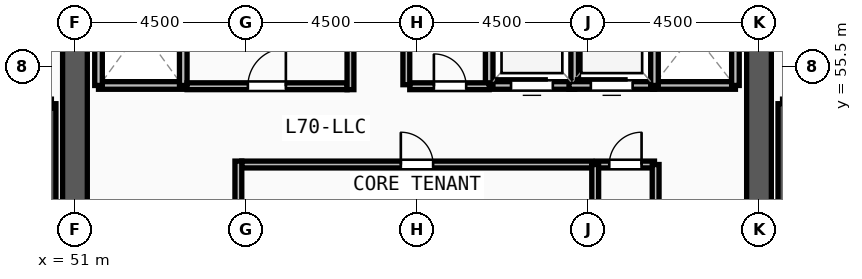
"""IFC4 building model, lengths in metres.
Left out: names, types, materials, properties, quantities, classifications, styles, units other than length and angle.
Written with IfcOpenShell. Run it as: python <this file> out.ifc"""

import sys

from ifc_helpers import new_model, si_unit, direction, frame, frame_2d, origin, place, context, subcontext, project, spatial, rectangle, extrude, source, transform, mapped, element, fill, save


model = new_model("IFC4")
c1 = context("Model", 3, precision=1e-05, world=origin(), true_north=direction((0.0, 1.0)))
c2 = subcontext(c1, "Body", "Model", "MODEL_VIEW")
j1 = project(units=[si_unit("LENGTHUNIT", "METRE"), si_unit("PLANEANGLEUNIT", "RADIAN")], contexts=[c1])
p1 = place(None, origin())
s1 = spatial("IfcSite", under=j1, at=p1, CompositionType="ELEMENT")
p2 = place(p1, origin())
s2 = spatial("IfcBuilding", under=s1, at=p2, CompositionType="ELEMENT")
p3 = place(p2, frame((0.0, 0.0, 270.0)))
s3 = spatial("IfcBuildingStorey", under=s2, at=p3, CompositionType="ELEMENT", Elevation=270.0)
p4 = place(p3, frame((69.0, 60.825, 0.0), z_axis=(0.0, 0.0, 1.0), x_axis=(0.0, -1.0, 0.0)))
e1 = element("IfcWall", 1, at=p4, inside=s3, PredefinedType="SHEAR", context=c2, shape_type="SweptSolid", body=[
    extrude(rectangle(XDim=13.65, YDim=0.65, at=frame_2d((6.825, 0.0))), origin(), (0.0, 0.0, 1.0), 3.57),
])
m1 = source(origin(), c2, "Body", "SweptSolid", [
    extrude(rectangle(XDim=1.2, YDim=2.2, at=frame_2d((0.6, 1.1))), frame((0.0, 0.335, 0.0), z_axis=(0.0, -1.0, 0.0), x_axis=(1.0, 0.0, 0.0)), (0.0, 0.0, 1.0), 0.67),
])
p5 = place(p4, frame((1.275, 0.0, 0.0)))
e2 = element("IfcOpeningElement", 2, at=p5, cuts=e1, PredefinedType="OPENING", context=c2, shape_type="MappedRepresentation", body=[
    mapped(m1, transform((0.0, 0.0, 0.0), x_axis=(1.0, 0.0, 0.0), y_axis=(0.0, 1.0, 0.0), z_axis=(0.0, 0.0, 1.0), scale=1.0)),
])
p6 = place(p3, frame((51.0, 47.175, 0.0), z_axis=(0.0, 0.0, 1.0), x_axis=(0.0, 1.0, 0.0)))
e3 = element("IfcWall", 3, at=p6, inside=s3, PredefinedType="SHEAR", context=c2, shape_type="SweptSolid", body=[
    extrude(rectangle(XDim=13.65, YDim=0.65, at=frame_2d((6.825, 0.0))), origin(), (0.0, 0.0, 1.0), 3.57),
])
for number, where, z_axis, x_axis in (
    (4, (50.38, 46.7, 0.0), (0.0, 0.0, 1.0), (0.0, 1.0, 0.0)),
    (5, (69.62, 54.52, 0.0), (0.0, 0.0, 1.0), (0.0, -1.0, 0.0)),
):
    element("IfcWall", number, at=place(p3, frame(where, z_axis=z_axis, x_axis=x_axis)), inside=s3, PredefinedType="SOLIDWALL", context=c2, shape_type="SweptSolid", body=[
        extrude(rectangle(XDim=7.82, YDim=0.24, at=frame_2d((3.91, 0.0))), origin(), (0.0, 0.0, 1.0), 3.57),
    ])
p7 = place(p3, frame((51.62, 55.0, 0.0), z_axis=(0.0, 0.0, 1.0), x_axis=(1.0, 0.0, 0.0)))
e6 = element("IfcWall", 6, at=p7, inside=s3, PredefinedType="SOLIDWALL", context=c2, shape_type="SweptSolid", body=[
    extrude(rectangle(XDim=2.23, YDim=0.2, at=frame_2d((1.115, 0.0))), origin(), (0.0, 0.0, 1.0), 3.57),
])
for number, where, z_axis, x_axis in (
    (7, (53.85, 55.0, 0.0), (0.0, 0.0, 1.0), (0.0, 1.0, 0.0)),
    (8, (51.62, 58.0, 0.0), (0.0, 0.0, 1.0), (0.0, -1.0, 0.0)),
):
    element("IfcWall", number, at=place(p3, frame(where, z_axis=z_axis, x_axis=x_axis)), inside=s3, PredefinedType="SOLIDWALL", context=c2, shape_type="SweptSolid", body=[
        extrude(rectangle(XDim=3.0, YDim=0.2, at=frame_2d((1.5, 0.0))), origin(), (0.0, 0.0, 1.0), 3.57),
    ])
p8 = place(p3, frame((66.2, 55.0, 0.0), z_axis=(0.0, 0.0, 1.0), x_axis=(1.0, 0.0, 0.0)))
e9 = element("IfcWall", 9, at=p8, inside=s3, PredefinedType="SOLIDWALL", context=c2, shape_type="SweptSolid", body=[
    extrude(rectangle(XDim=2.18, YDim=0.2, at=frame_2d((1.09, 0.0))), origin(), (0.0, 0.0, 1.0), 3.57),
])
p9 = place(p3, frame((68.38, 55.0, 0.0), z_axis=(0.0, 0.0, 1.0), x_axis=(0.0, 1.0, 0.0)))
e10 = element("IfcWall", 10, at=p9, inside=s3, PredefinedType="SOLIDWALL", context=c2, shape_type="SweptSolid", body=[
    extrude(rectangle(XDim=2.75, YDim=0.2, at=frame_2d((1.375, 0.0))), origin(), (0.0, 0.0, 1.0), 3.57),
])
p10 = place(p3, frame((61.9, 55.0, 0.0), z_axis=(0.0, 0.0, 1.0), x_axis=(1.0, 0.0, 0.0)))
e11 = element("IfcWall", 11, at=p10, inside=s3, PredefinedType="SOLIDWALL", context=c2, shape_type="SweptSolid", body=[
    extrude(rectangle(XDim=2.25, YDim=0.2, at=frame_2d((1.125, 0.0))), origin(), (0.0, 0.0, 1.0), 3.57),
])
m2 = source(origin(), c2, "Body", "SweptSolid", [
    extrude(rectangle(XDim=1.1, YDim=2.2, at=frame_2d((0.55, 1.1))), frame((0.0, 0.11, 0.0), z_axis=(0.0, -1.0, 0.0), x_axis=(1.0, 0.0, 0.0)), (0.0, 0.0, 1.0), 0.22),
])
p11 = place(p10, frame((0.575, 0.0, 0.0)))
e12 = element("IfcOpeningElement", 12, at=p11, cuts=e11, PredefinedType="OPENING", context=c2, shape_type="MappedRepresentation", body=[
    mapped(m2, transform((0.0, 0.0, 0.0), x_axis=(1.0, 0.0, 0.0), y_axis=(0.0, 1.0, 0.0), z_axis=(0.0, 0.0, 1.0), scale=1.0)),
])
for number, where, z_axis, x_axis in (
    (13, (64.15, 55.0, 0.0), (0.0, 0.0, 1.0), (0.0, 1.0, 0.0)),
    (14, (61.9, 57.6, 0.0), (0.0, 0.0, 1.0), (0.0, -1.0, 0.0)),
):
    element("IfcWall", number, at=place(p3, frame(where, z_axis=z_axis, x_axis=x_axis)), inside=s3, PredefinedType="SOLIDWALL", context=c2, shape_type="SweptSolid", body=[
        extrude(rectangle(XDim=2.6, YDim=0.2, at=frame_2d((1.3, 0.0))), origin(), (0.0, 0.0, 1.0), 3.57),
    ])
p12 = place(p3, frame((64.0, 55.0, 0.0), z_axis=(0.0, 0.0, 1.0), x_axis=(1.0, 0.0, 0.0)))
e15 = element("IfcWall", 15, at=p12, inside=s3, PredefinedType="SOLIDWALL", context=c2, shape_type="SweptSolid", body=[
    extrude(rectangle(XDim=2.25, YDim=0.2, at=frame_2d((1.125, 0.0))), origin(), (0.0, 0.0, 1.0), 3.57),
])
p13 = place(p12, frame((0.575, 0.0, 0.0)))
e16 = element("IfcOpeningElement", 16, at=p13, cuts=e15, PredefinedType="OPENING", context=c2, shape_type="MappedRepresentation", body=[
    mapped(m2, transform((0.0, 0.0, 0.0), x_axis=(1.0, 0.0, 0.0), y_axis=(0.0, 1.0, 0.0), z_axis=(0.0, 0.0, 1.0), scale=1.0)),
])
p14 = place(p3, frame((66.25, 55.0, 0.0), z_axis=(0.0, 0.0, 1.0), x_axis=(0.0, 1.0, 0.0)))
e17 = element("IfcWall", 17, at=p14, inside=s3, PredefinedType="SOLIDWALL", context=c2, shape_type="SweptSolid", body=[
    extrude(rectangle(XDim=2.6, YDim=0.2, at=frame_2d((1.3, 0.0))), origin(), (0.0, 0.0, 1.0), 3.57),
])
p15 = place(p3, frame((55.39, 52.92, 0.0), z_axis=(0.0, 0.0, 1.0), x_axis=(1.0, 0.0, 0.0)))
e18 = element("IfcWall", 18, at=p15, inside=s3, PredefinedType="PARTITIONING", context=c2, shape_type="SweptSolid", body=[
    extrude(rectangle(XDim=9.21, YDim=0.18, at=frame_2d((4.605, 0.0))), origin(), (0.0, 0.0, 1.0), 3.57),
])
m3 = source(origin(), c2, "Body", "SweptSolid", [
    extrude(rectangle(XDim=0.85, YDim=2.1, at=frame_2d((0.425, 1.05))), frame((0.0, 0.1, 0.0), z_axis=(0.0, -1.0, 0.0), x_axis=(1.0, 0.0, 0.0)), (0.0, 0.0, 1.0), 0.2),
])
p16 = place(p15, frame((4.185, 0.0, 0.0)))
e19 = element("IfcOpeningElement", 19, at=p16, cuts=e18, PredefinedType="OPENING", context=c2, shape_type="MappedRepresentation", body=[
    mapped(m3, transform((0.0, 0.0, 0.0), x_axis=(1.0, 0.0, 0.0), y_axis=(0.0, 1.0, 0.0), z_axis=(0.0, 0.0, 1.0), scale=1.0)),
])
p17 = place(p3, frame((53.95, 54.98, 0.0), z_axis=(0.0, 0.0, 1.0), x_axis=(1.0, 0.0, 0.0)))
e20 = element("IfcWall", 20, at=p17, inside=s3, PredefinedType="PARTITIONING", context=c2, shape_type="SweptSolid", body=[
    extrude(rectangle(XDim=4.21, YDim=0.18, at=frame_2d((2.105, 0.0))), origin(), (0.0, 0.0, 1.0), 3.57),
])
m4 = source(origin(), c2, "Body", "SweptSolid", [
    extrude(rectangle(XDim=1.0, YDim=2.2, at=frame_2d((0.5, 1.1))), frame((0.0, 0.1, 0.0), z_axis=(0.0, -1.0, 0.0), x_axis=(1.0, 0.0, 0.0)), (0.0, 0.0, 1.0), 0.2),
])
p18 = place(p17, frame((1.6, 0.0, 0.0)))
e21 = element("IfcOpeningElement", 21, at=p18, cuts=e20, PredefinedType="OPENING", context=c2, shape_type="MappedRepresentation", body=[
    mapped(m4, transform((0.0, 0.0, 0.0), x_axis=(1.0, 0.0, 0.0), y_axis=(0.0, 1.0, 0.0), z_axis=(0.0, 0.0, 1.0), scale=1.0)),
])
p19 = place(p3, frame((59.81, 54.98, 0.0), z_axis=(0.0, 0.0, 1.0), x_axis=(1.0, 0.0, 0.0)))
e22 = element("IfcWall", 22, at=p19, inside=s3, PredefinedType="PARTITIONING", context=c2, shape_type="SweptSolid", body=[
    extrude(rectangle(XDim=2.09, YDim=0.18, at=frame_2d((1.045, 0.0))), origin(), (0.0, 0.0, 1.0), 3.57),
])
p20 = place(p19, frame((0.635, 0.0, 0.0)))
e23 = element("IfcOpeningElement", 23, at=p20, cuts=e22, PredefinedType="OPENING", context=c2, shape_type="MappedRepresentation", body=[
    mapped(m3, transform((0.0, 0.0, 0.0), x_axis=(1.0, 0.0, 0.0), y_axis=(0.0, 1.0, 0.0), z_axis=(0.0, 0.0, 1.0), scale=1.0)),
])
p21 = place(p3, frame((64.72, 52.92, 0.0), z_axis=(0.0, 0.0, 1.0), x_axis=(1.0, 0.0, 0.0)))
e24 = element("IfcWall", 24, at=p21, inside=s3, PredefinedType="PARTITIONING", context=c2, shape_type="SweptSolid", body=[
    extrude(rectangle(XDim=1.53, YDim=0.18, at=frame_2d((0.765, 0.0))), origin(), (0.0, 0.0, 1.0), 3.57),
])
p22 = place(p21, frame((0.34, 0.0, 0.0)))
e25 = element("IfcOpeningElement", 25, at=p22, cuts=e24, PredefinedType="OPENING", context=c2, shape_type="MappedRepresentation", body=[
    mapped(m3, transform((0.0, 0.0, 0.0), x_axis=(1.0, 0.0, 0.0), y_axis=(0.0, 1.0, 0.0), z_axis=(0.0, 0.0, 1.0), scale=1.0)),
])
p23 = place(p3, frame((59.72, 55.02, 0.0), z_axis=(0.0, 0.0, 1.0), x_axis=(0.0, 1.0, 0.0)))
e26 = element("IfcWall", 26, at=p23, inside=s3, PredefinedType="PARTITIONING", context=c2, shape_type="SweptSolid", body=[
    extrude(rectangle(XDim=1.73, YDim=0.18, at=frame_2d((0.865, 0.0))), origin(), (0.0, 0.0, 1.0), 3.57),
])
for number, where, z_axis, x_axis in (
    (27, (64.69, 50.35, 0.0), (0.0, 0.0, 1.0), (0.0, 1.0, 0.0)),
    (28, (66.28, 50.35, 0.0), (0.0, 0.0, 1.0), (0.0, 1.0, 0.0)),
):
    element("IfcWall", number, at=place(p3, frame(where, z_axis=z_axis, x_axis=x_axis)), inside=s3, PredefinedType="PARTITIONING", context=c2, shape_type="SweptSolid", body=[
        extrude(rectangle(XDim=2.57, YDim=0.18, at=frame_2d((1.285, 0.0))), origin(), (0.0, 0.0, 1.0), 3.57),
    ])
p24 = place(p3, frame((55.3, 50.36, 0.0), z_axis=(0.0, 0.0, 1.0), x_axis=(0.0, 1.0, 0.0)))
e29 = element("IfcWall", 29, at=p24, inside=s3, PredefinedType="PARTITIONING", context=c2, shape_type="SweptSolid", body=[
    extrude(rectangle(XDim=2.65, YDim=0.18, at=frame_2d((1.325, 0.0))), origin(), (0.0, 0.0, 1.0), 3.57),
])
p25 = place(p3, frame((58.25, 54.89, 0.0), z_axis=(0.0, 0.0, 1.0), x_axis=(0.0, 1.0, 0.0)))
e30 = element("IfcWall", 30, at=p25, inside=s3, PredefinedType="PARTITIONING", context=c2, shape_type="SweptSolid", body=[
    extrude(rectangle(XDim=2.78, YDim=0.18, at=frame_2d((1.39, 0.0))), origin(), (0.0, 0.0, 1.0), 3.57),
])
m5 = source(origin(), c2, "Body", "SweptSolid", [
    extrude(rectangle(XDim=1.1, YDim=2.2, at=frame_2d((0.55, 1.1))), frame((0.0, 0.025, 0.0), z_axis=(0.0, -1.0, 0.0), x_axis=(1.0, 0.0, 0.0)), (0.0, 0.0, 1.0), 0.05),
])
p26 = place(p11, origin())
e31 = element("IfcDoor", 31, at=p26, inside=s3, OperationType="SLIDING_TO_LEFT", PredefinedType="DOOR", context=c2, shape_type="MappedRepresentation", body=[
    mapped(m5, transform((0.0, 0.0, 0.0), x_axis=(1.0, 0.0, 0.0), y_axis=(0.0, 1.0, 0.0), z_axis=(0.0, 0.0, 1.0), scale=1.0)),
])
fill(e12, e31)
p27 = place(p13, origin())
e32 = element("IfcDoor", 32, at=p27, inside=s3, OperationType="SLIDING_TO_LEFT", PredefinedType="DOOR", context=c2, shape_type="MappedRepresentation", body=[
    mapped(m5, transform((0.0, 0.0, 0.0), x_axis=(1.0, 0.0, 0.0), y_axis=(0.0, 1.0, 0.0), z_axis=(0.0, 0.0, 1.0), scale=1.0)),
])
fill(e16, e32)
m6 = source(origin(), c2, "Body", "SweptSolid", [
    extrude(rectangle(XDim=0.85, YDim=2.1, at=frame_2d((0.425, 1.05))), frame((0.0, 0.025, 0.0), z_axis=(0.0, -1.0, 0.0), x_axis=(1.0, 0.0, 0.0)), (0.0, 0.0, 1.0), 0.05),
])
p28 = place(p16, origin())
e33 = element("IfcDoor", 33, at=p28, inside=s3, OperationType="SINGLE_SWING_LEFT", PredefinedType="DOOR", context=c2, shape_type="MappedRepresentation", body=[
    mapped(m6, transform((0.0, 0.0, 0.0), x_axis=(1.0, 0.0, 0.0), y_axis=(0.0, 1.0, 0.0), z_axis=(0.0, 0.0, 1.0), scale=1.0)),
])
fill(e19, e33)
m7 = source(origin(), c2, "Body", "SweptSolid", [
    extrude(rectangle(XDim=1.0, YDim=2.2, at=frame_2d((0.5, 1.1))), frame((0.0, 0.025, 0.0), z_axis=(0.0, -1.0, 0.0), x_axis=(1.0, 0.0, 0.0)), (0.0, 0.0, 1.0), 0.05),
])
p29 = place(p18, origin())
e34 = element("IfcDoor", 34, at=p29, inside=s3, OperationType="SINGLE_SWING_RIGHT", PredefinedType="DOOR", context=c2, shape_type="MappedRepresentation", body=[
    mapped(m7, transform((0.0, 0.0, 0.0), x_axis=(1.0, 0.0, 0.0), y_axis=(0.0, 1.0, 0.0), z_axis=(0.0, 0.0, 1.0), scale=1.0)),
])
fill(e21, e34)
p30 = place(p20, origin())
e35 = element("IfcDoor", 35, at=p30, inside=s3, OperationType="SINGLE_SWING_LEFT", PredefinedType="DOOR", context=c2, shape_type="MappedRepresentation", body=[
    mapped(m6, transform((0.0, 0.0, 0.0), x_axis=(1.0, 0.0, 0.0), y_axis=(0.0, 1.0, 0.0), z_axis=(0.0, 0.0, 1.0), scale=1.0)),
])
fill(e23, e35)
p31 = place(p22, origin())
e36 = element("IfcDoor", 36, at=p31, inside=s3, OperationType="SINGLE_SWING_RIGHT", PredefinedType="DOOR", context=c2, shape_type="MappedRepresentation", body=[
    mapped(m6, transform((0.0, 0.0, 0.0), x_axis=(1.0, 0.0, 0.0), y_axis=(0.0, 1.0, 0.0), z_axis=(0.0, 0.0, 1.0), scale=1.0)),
])
fill(e25, e36)
save(model, sys.argv[1])
